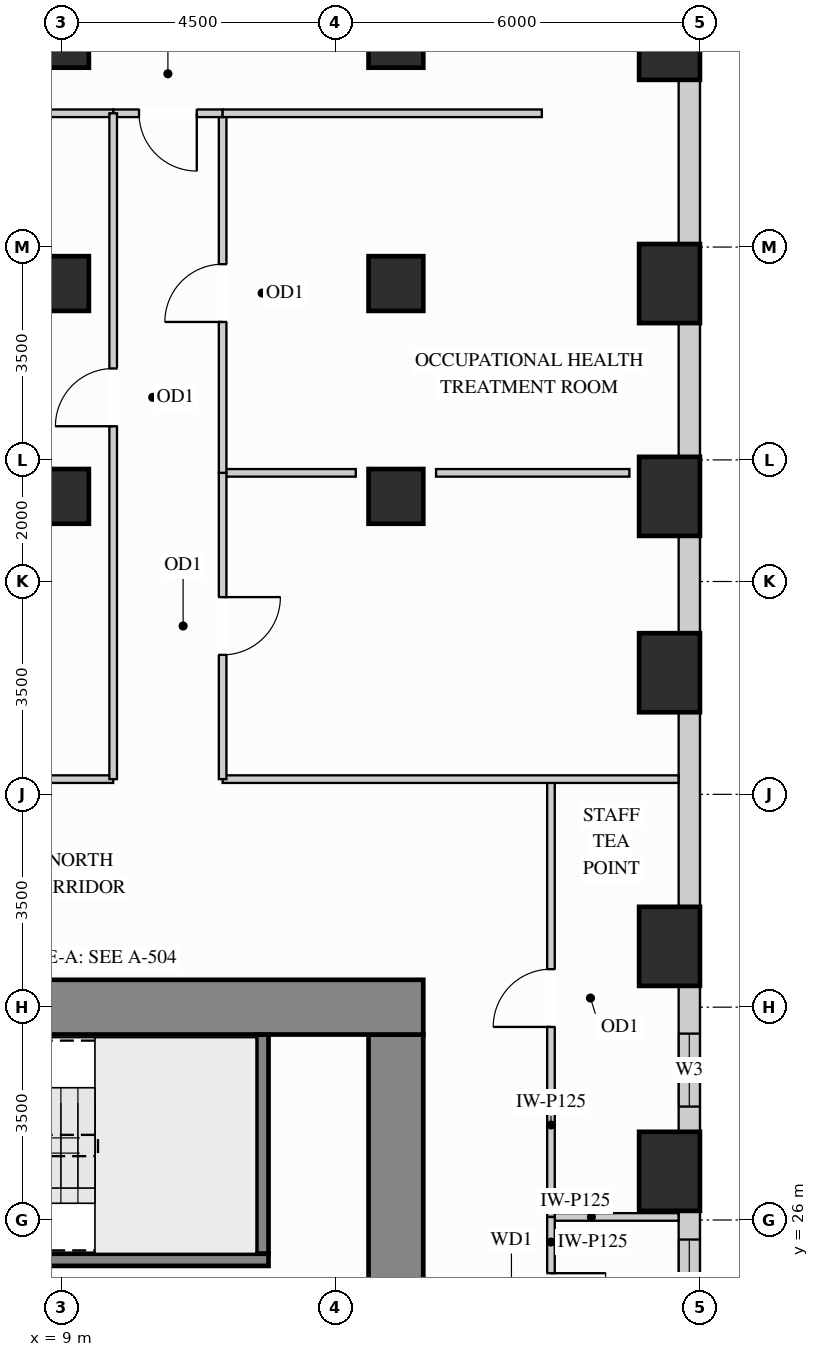
"""IFC4 building model, lengths in metres.
Left out: names, types, materials, properties, quantities, classifications, styles, units other than length and angle.
Written with IfcOpenShell. Run it as: python <this file> out.ifc"""

import sys

from ifc_helpers import new_model, si_unit, direction, frame, frame_2d, origin, origin_2d, place, context, subcontext, project, spatial, rectangle, extrude, source, transform, mapped, element, fill, save


model = new_model("IFC4")
c1 = context("Model", 3, precision=1e-05, world=origin(), true_north=direction((0.0, 1.0)))
c2 = subcontext(c1, "Body", "Model", "MODEL_VIEW")
j1 = project(units=[si_unit("LENGTHUNIT", "METRE"), si_unit("PLANEANGLEUNIT", "RADIAN")], contexts=[c1])
p1 = place(None, origin())
s1 = spatial("IfcSite", under=j1, at=p1, CompositionType="ELEMENT")
p2 = place(p1, origin())
s2 = spatial("IfcBuilding", under=s1, at=p2, CompositionType="ELEMENT")
p3 = place(p2, frame((0.0, 0.0, 54.9)))
s3 = spatial("IfcBuildingStorey", under=s2, at=p3, CompositionType="ELEMENT", Elevation=54.9)
m1 = source(origin(), c2, "Body", "SweptSolid", [
    extrude(rectangle(XDim=0.9, YDim=0.9, at=origin_2d()), origin(), (0.0, 0.0, 1.0), 3.38),
])
for number, where, z_axis, x_axis in (
    (1, (14.5, 37.9, 0.0), (0.0, 0.0, 1.0), (1.0, 0.0, 0.0)),
    (2, (14.5, 41.4, 0.0), (0.0, 0.0, 1.0), (1.0, 0.0, 0.0)),
    (3, (14.5, 45.4, 0.0), (0.0, 0.0, 1.0), (1.0, 0.0, 0.0)),
    (4, (9.0, 37.9, 0.0), (0.0, 0.0, 1.0), (1.0, 0.0, 0.0)),
    (5, (9.0, 41.4, 0.0), (0.0, 0.0, 1.0), (1.0, 0.0, 0.0)),
    (6, (9.0, 45.4, 0.0), (0.0, 0.0, 1.0), (1.0, 0.0, 0.0)),
):
    element("IfcColumn", number, at=place(p3, frame(where, z_axis=z_axis, x_axis=x_axis)), inside=s3, PredefinedType="COLUMN", context=c2, shape_type="MappedRepresentation", body=[
        mapped(m1, transform((0.0, 0.0, 0.0), x_axis=(1.0, 0.0, 0.0), y_axis=(0.0, 1.0, 0.0), z_axis=(0.0, 0.0, 1.0))),
    ])
m2 = source(origin(), c2, "Body", "SweptSolid", [
    extrude(rectangle(XDim=1.0, YDim=1.3, at=origin_2d()), origin(), (0.0, 0.0, 1.0), 3.38),
])
for number, where, z_axis, x_axis in (
    (7, (19.0, 26.8, 0.0), (0.0, 0.0, 1.0), (1.0, 0.0, 0.0)),
    (8, (19.0, 30.5, 0.0), (0.0, 0.0, 1.0), (1.0, 0.0, 0.0)),
    (9, (19.0, 35.0, 0.0), (0.0, 0.0, 1.0), (1.0, 0.0, 0.0)),
    (10, (19.0, 37.9, 0.0), (0.0, 0.0, 1.0), (1.0, 0.0, 0.0)),
    (11, (19.0, 41.4, 0.0), (0.0, 0.0, 1.0), (1.0, 0.0, 0.0)),
    (12, (19.0, 45.4, 0.0), (0.0, 0.0, 1.0), (1.0, 0.0, 0.0)),
):
    element("IfcColumn", number, at=place(p3, frame(where, z_axis=z_axis, x_axis=x_axis)), inside=s3, PredefinedType="COLUMN", context=c2, shape_type="MappedRepresentation", body=[
        mapped(m2, transform((0.0, 0.0, 0.0), x_axis=(1.0, 0.0, 0.0), y_axis=(0.0, 1.0, 0.0), z_axis=(0.0, 0.0, 1.0))),
    ])
m3 = source(origin(), c2, "Body", "SweptSolid", [
    extrude(rectangle(XDim=8.17, YDim=0.9, at=frame_2d((4.085, 0.0))), origin(), (0.0, 0.0, 1.0), 3.38),
])
p4 = place(p3, frame((14.5, 20.88, 0.0), z_axis=(0.0, 0.0, 1.0), x_axis=(0.0, 1.0, 0.0)))
e13 = element("IfcWall", 13, at=p4, inside=s3, PredefinedType="SHEAR", context=c2, shape_type="MappedRepresentation", body=[
    mapped(m3, transform((0.0, 0.0, 0.0), x_axis=(1.0, 0.0, 0.0), y_axis=(0.0, 1.0, 0.0), z_axis=(0.0, 0.0, 1.0))),
])
m4 = source(origin(), c2, "Body", "SweptSolid", [
    extrude(rectangle(XDim=10.9, YDim=0.9, at=frame_2d((5.45, 0.0))), origin(), (0.0, 0.0, 1.0), 3.38),
])
p5 = place(p3, frame((4.05, 29.5, 0.0), z_axis=(0.0, 0.0, 1.0), x_axis=(1.0, 0.0, 0.0)))
e14 = element("IfcWall", 14, at=p5, inside=s3, PredefinedType="SHEAR", context=c2, shape_type="MappedRepresentation", body=[
    mapped(m4, transform((0.0, 0.0, 0.0), x_axis=(1.0, 0.0, 0.0), y_axis=(0.0, 1.0, 0.0), z_axis=(0.0, 0.0, 1.0))),
])
p6 = place(p3, frame((19.325, 23.148, 0.0), z_axis=(0.0, 0.0, 1.0), x_axis=(0.0, 1.0, 0.0)))
e15 = element("IfcWall", 15, at=p6, inside=s3, PredefinedType="SOLIDWALL", context=c2, shape_type="SweptSolid", body=[
    extrude(rectangle(XDim=3.004, YDim=0.35, at=frame_2d((1.502, 0.0))), origin(), (0.0, 0.0, 1.0), 2.51),
])
p7 = place(p6, frame((1.031, 0.0, 0.78)))
e16 = element("IfcOpeningElement", 16, at=p7, cuts=e15, PredefinedType="OPENING", context=c2, shape_type="SweptSolid", body=[
    extrude(rectangle(XDim=1.5, YDim=1.55, at=frame_2d((0.75, 0.775))), frame((0.0, 0.185, 0.0), z_axis=(0.0, -1.0, 0.0), x_axis=(1.0, 0.0, 0.0)), (0.0, 0.0, 1.0), 0.37),
])
p8 = place(p3, frame((19.325, 27.448, 0.0), z_axis=(0.0, 0.0, 1.0), x_axis=(0.0, 1.0, 0.0)))
e17 = element("IfcWall", 17, at=p8, inside=s3, PredefinedType="SOLIDWALL", context=c2, shape_type="SweptSolid", body=[
    extrude(rectangle(XDim=2.404, YDim=0.35, at=frame_2d((1.202, 0.0))), origin(), (0.0, 0.0, 1.0), 2.51),
])
p9 = place(p8, frame((0.417, 0.0, 0.78)))
e18 = element("IfcOpeningElement", 18, at=p9, cuts=e17, PredefinedType="OPENING", context=c2, shape_type="SweptSolid", body=[
    extrude(rectangle(XDim=1.2, YDim=1.55, at=frame_2d((0.6, 0.775))), frame((0.0, 0.185, 0.0), z_axis=(0.0, -1.0, 0.0), x_axis=(1.0, 0.0, 0.0)), (0.0, 0.0, 1.0), 0.37),
])
m5 = source(origin(), c2, "Body", "SweptSolid", [
    extrude(rectangle(XDim=3.204, YDim=0.35, at=frame_2d((1.602, 0.0))), origin(), (0.0, 0.0, 1.0), 2.51),
])
p10 = place(p3, frame((19.325, 31.148, 0.0), z_axis=(0.0, 0.0, 1.0), x_axis=(0.0, 1.0, 0.0)))
e19 = element("IfcWall", 19, at=p10, inside=s3, PredefinedType="SOLIDWALL", context=c2, shape_type="MappedRepresentation", body=[
    mapped(m5, transform((0.0, 0.0, 0.0), x_axis=(1.0, 0.0, 0.0), y_axis=(0.0, 1.0, 0.0), z_axis=(0.0, 0.0, 1.0))),
])
m6 = source(origin(), c2, "Body", "SweptSolid", [
    extrude(rectangle(XDim=1.604, YDim=0.35, at=frame_2d((0.802, 0.0))), origin(), (0.0, 0.0, 1.0), 2.51),
])
p11 = place(p3, frame((19.325, 35.648, 0.0), z_axis=(0.0, 0.0, 1.0), x_axis=(0.0, 1.0, 0.0)))
e20 = element("IfcWall", 20, at=p11, inside=s3, PredefinedType="SOLIDWALL", context=c2, shape_type="MappedRepresentation", body=[
    mapped(m6, transform((0.0, 0.0, 0.0), x_axis=(1.0, 0.0, 0.0), y_axis=(0.0, 1.0, 0.0), z_axis=(0.0, 0.0, 1.0))),
])
m7 = source(origin(), c2, "Body", "SweptSolid", [
    extrude(rectangle(XDim=2.204, YDim=0.35, at=frame_2d((1.102, 0.0))), origin(), (0.0, 0.0, 1.0), 2.51),
])
p12 = place(p3, frame((19.325, 38.548, 0.0), z_axis=(0.0, 0.0, 1.0), x_axis=(0.0, 1.0, 0.0)))
e21 = element("IfcWall", 21, at=p12, inside=s3, PredefinedType="SOLIDWALL", context=c2, shape_type="MappedRepresentation", body=[
    mapped(m7, transform((0.0, 0.0, 0.0), x_axis=(1.0, 0.0, 0.0), y_axis=(0.0, 1.0, 0.0), z_axis=(0.0, 0.0, 1.0))),
])
m8 = source(origin(), c2, "Body", "SweptSolid", [
    extrude(rectangle(XDim=2.704, YDim=0.35, at=frame_2d((1.352, 0.0))), origin(), (0.0, 0.0, 1.0), 2.51),
])
p13 = place(p3, frame((19.325, 42.048, 0.0), z_axis=(0.0, 0.0, 1.0), x_axis=(0.0, 1.0, 0.0)))
e22 = element("IfcWall", 22, at=p13, inside=s3, PredefinedType="SOLIDWALL", context=c2, shape_type="MappedRepresentation", body=[
    mapped(m8, transform((0.0, 0.0, 0.0), x_axis=(1.0, 0.0, 0.0), y_axis=(0.0, 1.0, 0.0), z_axis=(0.0, 0.0, 1.0))),
])
m9 = source(origin(), c2, "Body", "SweptSolid", [
    extrude(rectangle(XDim=2.098, YDim=0.125, at=frame_2d((1.049, 0.0))), origin(), (0.0, 0.0, 1.0), 3.365),
])
p14 = place(p3, frame((17.05, 26.05, 0.0), z_axis=(0.0, 0.0, 1.0), x_axis=(1.0, 0.0, 0.0)))
e23 = element("IfcWall", 23, at=p14, inside=s3, PredefinedType="PARTITIONING", context=c2, shape_type="MappedRepresentation", body=[
    mapped(m9, transform((0.0, 0.0, 0.0), x_axis=(1.0, 0.0, 0.0), y_axis=(0.0, 1.0, 0.0), z_axis=(0.0, 0.0, 1.0))),
])
p15 = place(p3, frame((17.05, 26.05, 0.0), z_axis=(0.0, 0.0, 1.0), x_axis=(0.0, 1.0, 0.0)))
e24 = element("IfcWall", 24, at=p15, inside=s3, PredefinedType="PARTITIONING", context=c2, shape_type="SweptSolid", body=[
    extrude(rectangle(XDim=7.2, YDim=0.125, at=frame_2d((3.6, 0.0))), origin(), (0.0, 0.0, 1.0), 3.365),
])
p16 = place(p15, frame((3.125, 0.0, 0.0)))
e25 = element("IfcOpeningElement", 25, at=p16, cuts=e24, PredefinedType="OPENING", context=c2, shape_type="SweptSolid", body=[
    extrude(rectangle(XDim=0.95, YDim=2.15, at=frame_2d((0.475, 1.075))), frame((0.0, 0.073, 0.0), z_axis=(0.0, -1.0, 0.0), x_axis=(1.0, 0.0, 0.0)), (0.0, 0.0, 1.0), 0.145),
])
p17 = place(p3, frame((17.05, 23.35, 0.0), z_axis=(0.0, 0.0, 1.0), x_axis=(0.0, 1.0, 0.0)))
e26 = element("IfcWall", 26, at=p17, inside=s3, PredefinedType="PARTITIONING", context=c2, shape_type="SweptSolid", body=[
    extrude(rectangle(XDim=2.7, YDim=0.125, at=frame_2d((1.35, 0.0))), origin(), (0.0, 0.0, 1.0), 3.365),
])
p18 = place(p17, frame((0.875, 0.0, 0.0)))
e27 = element("IfcOpeningElement", 27, at=p18, cuts=e26, PredefinedType="OPENING", context=c2, shape_type="SweptSolid", body=[
    extrude(rectangle(XDim=0.9, YDim=2.15, at=frame_2d((0.45, 1.075))), frame((0.0, 0.073, 0.0), z_axis=(0.0, -1.0, 0.0), x_axis=(1.0, 0.0, 0.0)), (0.0, 0.0, 1.0), 0.145),
])
m10 = source(origin(), c2, "Body", "SweptSolid", [
    extrude(rectangle(XDim=2.19, YDim=0.125, at=frame_2d((1.095, 0.0))), origin(), (0.0, 0.0, 1.0), 3.365),
])
p19 = place(p3, frame((11.65, 38.287, 0.0), z_axis=(0.0, 0.0, 1.0), x_axis=(1.0, 0.0, 0.0)))
e28 = element("IfcWall", 28, at=p19, inside=s3, PredefinedType="PARTITIONING", context=c2, shape_type="MappedRepresentation", body=[
    mapped(m10, transform((0.0, 0.0, 0.0), x_axis=(1.0, 0.0, 0.0), y_axis=(0.0, 1.0, 0.0), z_axis=(0.0, 0.0, 1.0))),
])
m11 = source(origin(), c2, "Body", "SweptSolid", [
    extrude(rectangle(XDim=3.18, YDim=0.125, at=frame_2d((1.59, 0.0))), origin(), (0.0, 0.0, 1.0), 3.365),
])
p20 = place(p3, frame((15.16, 38.287, 0.0), z_axis=(0.0, 0.0, 1.0), x_axis=(1.0, 0.0, 0.0)))
e29 = element("IfcWall", 29, at=p20, inside=s3, PredefinedType="PARTITIONING", context=c2, shape_type="MappedRepresentation", body=[
    mapped(m11, transform((0.0, 0.0, 0.0), x_axis=(1.0, 0.0, 0.0), y_axis=(0.0, 1.0, 0.0), z_axis=(0.0, 0.0, 1.0))),
])
m12 = source(origin(), c2, "Body", "SweptSolid", [
    extrude(rectangle(XDim=7.498, YDim=0.125, at=frame_2d((3.749, 0.0))), origin(), (0.0, 0.0, 1.0), 2.828),
])
p21 = place(p3, frame((11.65, 33.25, 0.0), z_axis=(0.0, 0.0, 1.0), x_axis=(1.0, 0.0, 0.0)))
e30 = element("IfcWall", 30, at=p21, inside=s3, PredefinedType="PARTITIONING", context=c2, shape_type="MappedRepresentation", body=[
    mapped(m12, transform((0.0, 0.0, 0.0), x_axis=(1.0, 0.0, 0.0), y_axis=(0.0, 1.0, 0.0), z_axis=(0.0, 0.0, 1.0))),
])
m13 = source(origin(), c2, "Body", "SweptSolid", [
    extrude(rectangle(XDim=9.498, YDim=0.125, at=frame_2d((4.749, 0.0))), origin(), (0.0, 0.0, 1.0), 2.828),
])
p22 = place(p3, frame((0.352, 33.25, 0.0), z_axis=(0.0, 0.0, 1.0), x_axis=(1.0, 0.0, 0.0)))
e31 = element("IfcWall", 31, at=p22, inside=s3, PredefinedType="PARTITIONING", context=c2, shape_type="MappedRepresentation", body=[
    mapped(m13, transform((0.0, 0.0, 0.0), x_axis=(1.0, 0.0, 0.0), y_axis=(0.0, 1.0, 0.0), z_axis=(0.0, 0.0, 1.0))),
])
p23 = place(p3, frame((11.65, 33.25, 0.0), z_axis=(0.0, 0.0, 1.0), x_axis=(0.0, 1.0, 0.0)))
e32 = element("IfcWall", 32, at=p23, inside=s3, PredefinedType="PARTITIONING", context=c2, shape_type="SweptSolid", body=[
    extrude(rectangle(XDim=5.037, YDim=0.125, at=frame_2d((2.519, 0.0))), origin(), (0.0, 0.0, 1.0), 3.365),
])
p24 = place(p23, frame((2.043, 0.0, 0.0)))
e33 = element("IfcOpeningElement", 33, at=p24, cuts=e32, PredefinedType="OPENING", context=c2, shape_type="SweptSolid", body=[
    extrude(rectangle(XDim=0.95, YDim=2.15, at=frame_2d((0.475, 1.075))), frame((0.0, 0.073, 0.0), z_axis=(0.0, -1.0, 0.0), x_axis=(1.0, 0.0, 0.0)), (0.0, 0.0, 1.0), 0.145),
])
p25 = place(p3, frame((11.65, 38.287, 0.0), z_axis=(0.0, 0.0, 1.0), x_axis=(0.0, 1.0, 0.0)))
e34 = element("IfcWall", 34, at=p25, inside=s3, PredefinedType="PARTITIONING", context=c2, shape_type="SweptSolid", body=[
    extrude(rectangle(XDim=5.913, YDim=0.125, at=frame_2d((2.957, 0.0))), origin(), (0.0, 0.0, 1.0), 3.365),
])
p26 = place(p25, frame((2.481, 0.0, 0.0)))
e35 = element("IfcOpeningElement", 35, at=p26, cuts=e34, PredefinedType="OPENING", context=c2, shape_type="SweptSolid", body=[
    extrude(rectangle(XDim=0.95, YDim=2.15, at=frame_2d((0.475, 1.075))), frame((0.0, 0.073, 0.0), z_axis=(0.0, -1.0, 0.0), x_axis=(1.0, 0.0, 0.0)), (0.0, 0.0, 1.0), 0.145),
])
p27 = place(p3, frame((9.85, 44.2, 0.0), z_axis=(0.0, 0.0, 1.0), x_axis=(1.0, 0.0, 0.0)))
e36 = element("IfcWall", 36, at=p27, inside=s3, PredefinedType="PARTITIONING", context=c2, shape_type="SweptSolid", body=[
    extrude(rectangle(XDim=1.8, YDim=0.125, at=frame_2d((0.9, 0.0))), origin(), (0.0, 0.0, 1.0), 3.365),
])
p28 = place(p27, frame((0.425, 0.0, 0.0)))
e37 = element("IfcOpeningElement", 37, at=p28, cuts=e36, PredefinedType="OPENING", context=c2, shape_type="SweptSolid", body=[
    extrude(rectangle(XDim=0.95, YDim=2.15, at=frame_2d((0.475, 1.075))), frame((0.0, 0.073, 0.0), z_axis=(0.0, -1.0, 0.0), x_axis=(1.0, 0.0, 0.0)), (0.0, 0.0, 1.0), 0.145),
])
m14 = source(origin(), c2, "Body", "SweptSolid", [
    extrude(rectangle(XDim=5.25, YDim=0.125, at=frame_2d((2.625, 0.0))), origin(), (0.0, 0.0, 1.0), 3.365),
])
p29 = place(p3, frame((11.65, 44.2, 0.0), z_axis=(0.0, 0.0, 1.0), x_axis=(1.0, 0.0, 0.0)))
e38 = element("IfcWall", 38, at=p29, inside=s3, PredefinedType="PARTITIONING", context=c2, shape_type="MappedRepresentation", body=[
    mapped(m14, transform((0.0, 0.0, 0.0), x_axis=(1.0, 0.0, 0.0), y_axis=(0.0, 1.0, 0.0), z_axis=(0.0, 0.0, 1.0))),
])
m15 = source(origin(), c2, "Body", "SweptSolid", [
    extrude(rectangle(XDim=7.25, YDim=0.125, at=frame_2d((3.625, 0.0))), origin(), (0.0, 0.0, 1.0), 3.365),
])
p30 = place(p3, frame((2.6, 44.2, 0.0), z_axis=(0.0, 0.0, 1.0), x_axis=(1.0, 0.0, 0.0)))
e39 = element("IfcWall", 39, at=p30, inside=s3, PredefinedType="PARTITIONING", context=c2, shape_type="MappedRepresentation", body=[
    mapped(m15, transform((0.0, 0.0, 0.0), x_axis=(1.0, 0.0, 0.0), y_axis=(0.0, 1.0, 0.0), z_axis=(0.0, 0.0, 1.0))),
])
p31 = place(p3, frame((9.85, 33.25, 0.0), z_axis=(0.0, 0.0, 1.0), x_axis=(0.0, 1.0, 0.0)))
e40 = element("IfcWall", 40, at=p31, inside=s3, PredefinedType="PARTITIONING", context=c2, shape_type="SweptSolid", body=[
    extrude(rectangle(XDim=10.95, YDim=0.125, at=frame_2d((5.475, 0.0))), origin(), (0.0, 0.0, 1.0), 3.365),
])
p32 = place(p31, frame((5.803, 0.0, 0.0)))
e41 = element("IfcOpeningElement", 41, at=p32, cuts=e40, PredefinedType="OPENING", context=c2, shape_type="SweptSolid", body=[
    extrude(rectangle(XDim=0.95, YDim=2.15, at=frame_2d((0.475, 1.075))), frame((0.0, 0.073, 0.0), z_axis=(0.0, -1.0, 0.0), x_axis=(1.0, 0.0, 0.0)), (0.0, 0.0, 1.0), 0.145),
])
m16 = source(origin(), c2, "Body", "SweptSolid", [
    extrude(rectangle(XDim=3.603, YDim=0.2, at=frame_2d((1.802, 0.0))), origin(), (0.0, 0.0, 1.0), 3.38),
])
p33 = place(p3, frame((12.305, 25.445, 0.0), z_axis=(0.0, 0.0, 1.0), x_axis=(0.0, 1.0, 0.0)))
e42 = element("IfcWall", 42, at=p33, inside=s3, PredefinedType="SHEAR", context=c2, shape_type="MappedRepresentation", body=[
    mapped(m16, transform((0.0, 0.0, 0.0), x_axis=(1.0, 0.0, 0.0), y_axis=(0.0, 1.0, 0.0), z_axis=(0.0, 0.0, 1.0))),
])
p34 = place(p3, frame((4.952, 25.345, 0.0), z_axis=(0.0, 0.0, 1.0), x_axis=(1.0, 0.0, 0.0)))
e43 = element("IfcWall", 43, at=p34, inside=s3, PredefinedType="SHEAR", context=c2, shape_type="SweptSolid", body=[
    extrude(rectangle(XDim=7.453, YDim=0.2, at=frame_2d((3.727, 0.0))), origin(), (0.0, 0.0, 1.0), 3.38),
])
p35 = place(p34, frame((0.4, 0.0, 0.0)))
e44 = element("IfcOpeningElement", 44, at=p35, cuts=e43, PredefinedType="OPENING", context=c2, shape_type="SweptSolid", body=[
    extrude(rectangle(XDim=1.1, YDim=2.15, at=frame_2d((0.55, 1.075))), frame((0.0, 0.11, 0.0), z_axis=(0.0, -1.0, 0.0), x_axis=(1.0, 0.0, 0.0)), (0.0, 0.0, 1.0), 0.22),
])
m17 = source(origin(), c2, "Body", "SweptSolid", [
    extrude(rectangle(XDim=0.95, YDim=2.15, at=frame_2d((0.475, 1.075))), frame((0.0, 0.025, 0.0), z_axis=(0.0, -1.0, 0.0), x_axis=(1.0, 0.0, 0.0)), (0.0, 0.0, 1.0), 0.05),
])
p36 = place(p16, origin())
e45 = element("IfcDoor", 45, at=p36, inside=s3, OperationType="SINGLE_SWING_LEFT", PredefinedType="DOOR", context=c2, shape_type="MappedRepresentation", body=[
    mapped(m17, transform((0.0, 0.0, 0.0), x_axis=(1.0, 0.0, 0.0), y_axis=(0.0, 1.0, 0.0), z_axis=(0.0, 0.0, 1.0))),
])
fill(e25, e45)
p37 = place(p24, origin())
e46 = element("IfcDoor", 46, at=p37, inside=s3, OperationType="SINGLE_SWING_RIGHT", PredefinedType="DOOR", context=c2, shape_type="MappedRepresentation", body=[
    mapped(m17, transform((0.0, 0.0, 0.0), x_axis=(1.0, 0.0, 0.0), y_axis=(0.0, 1.0, 0.0), z_axis=(0.0, 0.0, 1.0))),
])
fill(e33, e46)
p38 = place(p26, origin())
e47 = element("IfcDoor", 47, at=p38, inside=s3, OperationType="SINGLE_SWING_LEFT", PredefinedType="DOOR", context=c2, shape_type="MappedRepresentation", body=[
    mapped(m17, transform((0.0, 0.0, 0.0), x_axis=(1.0, 0.0, 0.0), y_axis=(0.0, 1.0, 0.0), z_axis=(0.0, 0.0, 1.0))),
])
fill(e35, e47)
p39 = place(p28, origin())
e48 = element("IfcDoor", 48, at=p39, inside=s3, OperationType="SINGLE_SWING_RIGHT", PredefinedType="DOOR", context=c2, shape_type="MappedRepresentation", body=[
    mapped(m17, transform((0.0, 0.0, 0.0), x_axis=(1.0, 0.0, 0.0), y_axis=(0.0, 1.0, 0.0), z_axis=(0.0, 0.0, 1.0))),
])
fill(e37, e48)
p40 = place(p32, origin())
e49 = element("IfcDoor", 49, at=p40, inside=s3, OperationType="SINGLE_SWING_LEFT", PredefinedType="DOOR", context=c2, shape_type="MappedRepresentation", body=[
    mapped(m17, transform((0.0, 0.0, 0.0), x_axis=(1.0, 0.0, 0.0), y_axis=(0.0, 1.0, 0.0), z_axis=(0.0, 0.0, 1.0))),
])
fill(e41, e49)
m18 = source(origin(), c2, "Body", "SweptSolid", [
    extrude(rectangle(XDim=0.9, YDim=2.15, at=frame_2d((0.45, 1.075))), frame((0.0, 0.025, 0.0), z_axis=(0.0, -1.0, 0.0), x_axis=(1.0, 0.0, 0.0)), (0.0, 0.0, 1.0), 0.05),
])
p41 = place(p18, origin())
e50 = element("IfcDoor", 50, at=p41, inside=s3, OperationType="SINGLE_SWING_RIGHT", PredefinedType="DOOR", context=c2, shape_type="MappedRepresentation", body=[
    mapped(m18, transform((0.0, 0.0, 0.0), x_axis=(1.0, 0.0, 0.0), y_axis=(0.0, 1.0, 0.0), z_axis=(0.0, 0.0, 1.0))),
])
fill(e27, e50)
m19 = source(origin(), c2, "Body", "SweptSolid", [
    extrude(rectangle(XDim=1.2, YDim=1.55, at=frame_2d((0.6, 0.775))), frame((0.0, 0.03, 0.0), z_axis=(0.0, -1.0, 0.0), x_axis=(1.0, 0.0, 0.0)), (0.0, 0.0, 1.0), 0.06),
])
p42 = place(p9, origin())
e51 = element("IfcWindow", 51, at=p42, inside=s3, PartitioningType="SINGLE_PANEL", PredefinedType="WINDOW", context=c2, shape_type="MappedRepresentation", body=[
    mapped(m19, transform((0.0, 0.0, 0.0), x_axis=(1.0, 0.0, 0.0), y_axis=(0.0, 1.0, 0.0), z_axis=(0.0, 0.0, 1.0))),
])
fill(e18, e51)
m20 = source(origin(), c2, "Body", "SweptSolid", [
    extrude(rectangle(XDim=1.5, YDim=1.55, at=frame_2d((0.75, 0.775))), frame((0.0, 0.03, 0.0), z_axis=(0.0, -1.0, 0.0), x_axis=(1.0, 0.0, 0.0)), (0.0, 0.0, 1.0), 0.06),
])
p43 = place(p7, origin())
e52 = element("IfcWindow", 52, at=p43, inside=s3, PartitioningType="SINGLE_PANEL", PredefinedType="WINDOW", context=c2, shape_type="MappedRepresentation", body=[
    mapped(m20, transform((0.0, 0.0, 0.0), x_axis=(1.0, 0.0, 0.0), y_axis=(0.0, 1.0, 0.0), z_axis=(0.0, 0.0, 1.0))),
])
fill(e16, e52)
save(model, sys.argv[1])
